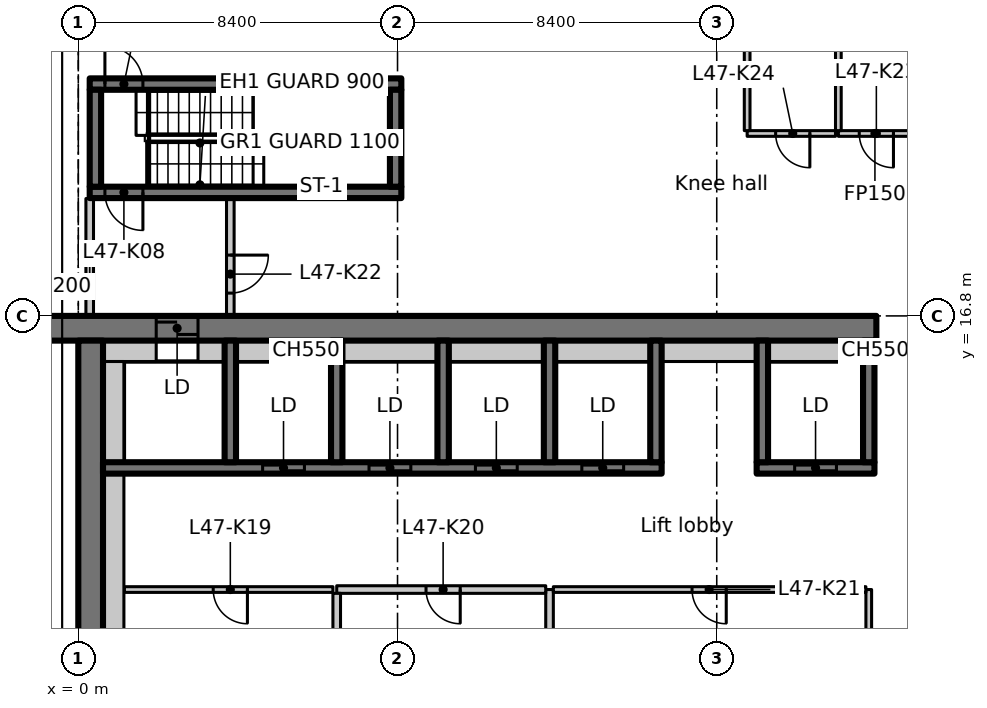
"""IFC4 building model, lengths in metres.
Left out: names, types, materials, properties, quantities, classifications, styles, units other than length and angle.
Written with IfcOpenShell. Run it as: python <this file> out.ifc"""

import sys

from ifc_helpers import new_model, si_unit, direction, frame, frame_2d, origin, place, context, subcontext, project, spatial, rectangle, extrude, element, fill, save


model = new_model("IFC4")
c1 = context("Model", 3, precision=1e-05, world=origin(), true_north=direction((0.0, 1.0)))
c2 = subcontext(c1, "Body", "Model", "MODEL_VIEW")
j1 = project(units=[si_unit("LENGTHUNIT", "METRE"), si_unit("PLANEANGLEUNIT", "RADIAN")], contexts=[c1])
p1 = place(None, origin())
s1 = spatial("IfcSite", under=j1, at=p1, CompositionType="ELEMENT")
p2 = place(p1, origin())
s2 = spatial("IfcBuilding", under=s1, at=p2, CompositionType="ELEMENT")
p3 = place(p2, frame((0.0, 0.0, 188.4)))
s3 = spatial("IfcBuildingStorey", under=s2, at=p3, CompositionType="ELEMENT", Elevation=188.4)
p4 = place(p3, frame((-1.1, 16.475, 0.0), z_axis=(0.0, 0.0, 1.0), x_axis=(1.0, 0.0, 0.0)))
e1 = element("IfcWall", 1, at=p4, inside=s3, PredefinedType="SHEAR", context=c2, shape_type="SweptSolid", body=[
    extrude(rectangle(XDim=22.1, YDim=0.65, at=frame_2d((11.05, 0.0))), origin(), (0.0, 0.0, 1.0), 3.35),
])
p5 = place(p4, frame((3.15, 0.0, 0.0)))
e2 = element("IfcOpeningElement", 2, at=p5, cuts=e1, PredefinedType="OPENING", context=c2, shape_type="SweptSolid", body=[
    extrude(rectangle(XDim=1.1, YDim=2.3, at=frame_2d((0.55, 1.15))), frame((0.0, 0.335, 0.0), z_axis=(0.0, -1.0, 0.0), x_axis=(1.0, 0.0, 0.0)), (0.0, 0.0, 1.0), 0.67),
])
p6 = place(p3, frame((0.325, 7.286, 0.0), z_axis=(0.0, 0.0, 1.0), x_axis=(0.0, 1.0, 0.0)))
e3 = element("IfcWall", 3, at=p6, inside=s3, PredefinedType="SHEAR", context=c2, shape_type="SweptSolid", body=[
    extrude(rectangle(XDim=8.864, YDim=0.65, at=frame_2d((4.432, 0.0))), origin(), (0.0, 0.0, 1.0), 3.35),
])
p7 = place(p3, frame((0.65, 15.875, 0.0), z_axis=(0.0, 0.0, 1.0), x_axis=(1.0, 0.0, 0.0)))
e4 = element("IfcWall", 4, at=p7, inside=s3, PredefinedType="PARTITIONING", context=c2, shape_type="SweptSolid", body=[
    extrude(rectangle(XDim=1.4, YDim=0.55, at=frame_2d((0.7, 0.0))), origin(), (0.0, 0.0, 1.0), 3.35),
])
p8 = place(p3, frame((0.65, 12.8, 0.0), z_axis=(0.0, 0.0, 1.0), x_axis=(1.0, 0.0, 0.0)))
e5 = element("IfcWall", 5, at=p8, inside=s3, PredefinedType="SHEAR", context=c2, shape_type="SweptSolid", body=[
    extrude(rectangle(XDim=14.7, YDim=0.3, at=frame_2d((7.35, 0.0))), origin(), (0.0, 0.0, 1.0), 3.35),
])
p9 = place(p8, frame((4.2, 0.0, 0.0)))
e6 = element("IfcOpeningElement", 6, at=p9, cuts=e5, PredefinedType="OPENING", context=c2, shape_type="SweptSolid", body=[
    extrude(rectangle(XDim=1.1, YDim=2.3, at=frame_2d((0.55, 1.15))), frame((0.0, 0.16, 0.0), z_axis=(0.0, -1.0, 0.0), x_axis=(1.0, 0.0, 0.0)), (0.0, 0.0, 1.0), 0.32),
])
p10 = place(p8, frame((7.0, 0.0, 0.0)))
e7 = element("IfcOpeningElement", 7, at=p10, cuts=e5, PredefinedType="OPENING", context=c2, shape_type="SweptSolid", body=[
    extrude(rectangle(XDim=1.1, YDim=2.3, at=frame_2d((0.55, 1.15))), frame((0.0, 0.16, 0.0), z_axis=(0.0, -1.0, 0.0), x_axis=(1.0, 0.0, 0.0)), (0.0, 0.0, 1.0), 0.32),
])
p11 = place(p8, frame((9.8, 0.0, 0.0)))
e8 = element("IfcOpeningElement", 8, at=p11, cuts=e5, PredefinedType="OPENING", context=c2, shape_type="SweptSolid", body=[
    extrude(rectangle(XDim=1.1, YDim=2.3, at=frame_2d((0.55, 1.15))), frame((0.0, 0.16, 0.0), z_axis=(0.0, -1.0, 0.0), x_axis=(1.0, 0.0, 0.0)), (0.0, 0.0, 1.0), 0.32),
])
p12 = place(p8, frame((12.6, 0.0, 0.0)))
e9 = element("IfcOpeningElement", 9, at=p12, cuts=e5, PredefinedType="OPENING", context=c2, shape_type="SweptSolid", body=[
    extrude(rectangle(XDim=1.1, YDim=2.3, at=frame_2d((0.55, 1.15))), frame((0.0, 0.16, 0.0), z_axis=(0.0, -1.0, 0.0), x_axis=(1.0, 0.0, 0.0)), (0.0, 0.0, 1.0), 0.32),
])
for number, where, z_axis, x_axis in (
    (10, (4.0, 12.95, 0.0), (0.0, 0.0, 1.0), (0.0, 1.0, 0.0)),
    (11, (6.8, 12.95, 0.0), (0.0, 0.0, 1.0), (0.0, 1.0, 0.0)),
    (12, (9.6, 12.95, 0.0), (0.0, 0.0, 1.0), (0.0, 1.0, 0.0)),
    (13, (12.4, 12.95, 0.0), (0.0, 0.0, 1.0), (0.0, 1.0, 0.0)),
    (14, (15.2, 12.95, 0.0), (0.0, 0.0, 1.0), (0.0, 1.0, 0.0)),
):
    element("IfcWall", number, at=place(p3, frame(where, z_axis=z_axis, x_axis=x_axis)), inside=s3, PredefinedType="SHEAR", context=c2, shape_type="SweptSolid", body=[
        extrude(rectangle(XDim=3.2, YDim=0.3, at=frame_2d((1.6, 0.0))), origin(), (0.0, 0.0, 1.0), 3.35),
    ])
p13 = place(p3, frame((17.85, 12.8, 0.0), z_axis=(0.0, 0.0, 1.0), x_axis=(1.0, 0.0, 0.0)))
e15 = element("IfcWall", 15, at=p13, inside=s3, PredefinedType="SHEAR", context=c2, shape_type="SweptSolid", body=[
    extrude(rectangle(XDim=3.1, YDim=0.3, at=frame_2d((1.55, 0.0))), origin(), (0.0, 0.0, 1.0), 3.35),
])
p14 = place(p13, frame((1.0, 0.0, 0.0)))
e16 = element("IfcOpeningElement", 16, at=p14, cuts=e15, PredefinedType="OPENING", context=c2, shape_type="SweptSolid", body=[
    extrude(rectangle(XDim=1.1, YDim=2.3, at=frame_2d((0.55, 1.15))), frame((0.0, 0.16, 0.0), z_axis=(0.0, -1.0, 0.0), x_axis=(1.0, 0.0, 0.0)), (0.0, 0.0, 1.0), 0.32),
])
for number, where, z_axis, x_axis in (
    (17, (18.0, 12.95, 0.0), (0.0, 0.0, 1.0), (0.0, 1.0, 0.0)),
    (18, (20.8, 12.95, 0.0), (0.0, 0.0, 1.0), (0.0, 1.0, 0.0)),
):
    element("IfcWall", number, at=place(p3, frame(where, z_axis=z_axis, x_axis=x_axis)), inside=s3, PredefinedType="SHEAR", context=c2, shape_type="SweptSolid", body=[
        extrude(rectangle(XDim=3.2, YDim=0.3, at=frame_2d((1.6, 0.0))), origin(), (0.0, 0.0, 1.0), 3.35),
    ])
p15 = place(p3, frame((8.5, 20.05, 0.0), z_axis=(0.0, 0.0, 1.0), x_axis=(-1.0, 0.0, 0.0)))
e19 = element("IfcWall", 19, at=p15, inside=s3, PredefinedType="SHEAR", context=c2, shape_type="SweptSolid", body=[
    extrude(rectangle(XDim=8.2, YDim=0.3, at=frame_2d((4.1, 0.0))), origin(), (0.0, 0.0, 1.0), 3.35),
])
p16 = place(p15, frame((6.8, 0.0, 0.0)))
e20 = element("IfcOpeningElement", 20, at=p16, cuts=e19, PredefinedType="OPENING", context=c2, shape_type="SweptSolid", body=[
    extrude(rectangle(XDim=1.0, YDim=2.1, at=frame_2d((0.5, 1.05))), frame((0.0, 0.16, 0.0), z_axis=(0.0, -1.0, 0.0), x_axis=(1.0, 0.0, 0.0)), (0.0, 0.0, 1.0), 0.32),
])
p17 = place(p3, frame((0.3, 22.9, 0.0), z_axis=(0.0, 0.0, 1.0), x_axis=(1.0, 0.0, 0.0)))
e21 = element("IfcWall", 21, at=p17, inside=s3, PredefinedType="SHEAR", context=c2, shape_type="SweptSolid", body=[
    extrude(rectangle(XDim=8.2, YDim=0.3, at=frame_2d((4.1, 0.0))), origin(), (0.0, 0.0, 1.0), 3.35),
])
p18 = place(p17, frame((0.4, 0.0, 0.0)))
e22 = element("IfcOpeningElement", 22, at=p18, cuts=e21, PredefinedType="OPENING", context=c2, shape_type="SweptSolid", body=[
    extrude(rectangle(XDim=1.0, YDim=2.1, at=frame_2d((0.5, 1.05))), frame((0.0, 0.16, 0.0), z_axis=(0.0, -1.0, 0.0), x_axis=(1.0, 0.0, 0.0)), (0.0, 0.0, 1.0), 0.32),
])
for number, where, z_axis, x_axis in (
    (23, (0.45, 20.2, 0.0), (0.0, 0.0, 1.0), (0.0, 1.0, 0.0)),
    (24, (8.35, 20.2, 0.0), (0.0, 0.0, 1.0), (0.0, 1.0, 0.0)),
):
    element("IfcWall", number, at=place(p3, frame(where, z_axis=z_axis, x_axis=x_axis)), inside=s3, PredefinedType="SHEAR", context=c2, shape_type="SweptSolid", body=[
        extrude(rectangle(XDim=2.55, YDim=0.3, at=frame_2d((1.275, 0.0))), origin(), (0.0, 0.0, 1.0), 3.35),
    ])
p19 = place(p3, frame((0.3, 16.812, 0.0), z_axis=(0.0, 0.0, 1.0), x_axis=(0.0, 1.0, 0.0)))
e25 = element("IfcWall", 25, at=p19, inside=s3, PredefinedType="PARTITIONING", context=c2, shape_type="SweptSolid", body=[
    extrude(rectangle(XDim=3.076, YDim=0.2, at=frame_2d((1.538, 0.0))), origin(), (0.0, 0.0, 1.0), 2.98),
])
p20 = place(p3, frame((4.0, 19.888, 0.0), z_axis=(0.0, 0.0, 1.0), x_axis=(0.0, -1.0, 0.0)))
e26 = element("IfcWall", 26, at=p20, inside=s3, PredefinedType="PARTITIONING", context=c2, shape_type="SweptSolid", body=[
    extrude(rectangle(XDim=3.076, YDim=0.2, at=frame_2d((1.538, 0.0))), origin(), (0.0, 0.0, 1.0), 3.35),
])
p21 = place(p20, frame((1.488, 0.0, 0.0)))
e27 = element("IfcOpeningElement", 27, at=p21, cuts=e26, PredefinedType="OPENING", context=c2, shape_type="SweptSolid", body=[
    extrude(rectangle(XDim=1.0, YDim=2.1, at=frame_2d((0.5, 1.05))), frame((0.0, 0.11, 0.0), z_axis=(0.0, -1.0, 0.0), x_axis=(1.0, 0.0, 0.0)), (0.0, 0.0, 1.0), 0.22),
])
p22 = place(p3, frame((12.4, 7.1, 0.0), z_axis=(0.0, 0.0, 1.0), x_axis=(0.0, 1.0, 0.0)))
e28 = element("IfcWall", 28, at=p22, inside=s3, PredefinedType="PARTITIONING", context=c2, shape_type="SweptSolid", body=[
    extrude(rectangle(XDim=2.5, YDim=0.2, at=frame_2d((1.25, 0.0))), origin(), (0.0, 0.0, 1.0), 3.35),
])
p23 = place(p3, frame((12.3, 9.6, 0.0), z_axis=(0.0, 0.0, 1.0), x_axis=(-1.0, 0.0, 0.0)))
e29 = element("IfcWall", 29, at=p23, inside=s3, PredefinedType="PARTITIONING", context=c2, shape_type="SweptSolid", body=[
    extrude(rectangle(XDim=5.5, YDim=0.2, at=frame_2d((2.75, 0.0))), origin(), (0.0, 0.0, 1.0), 3.35),
])
p24 = place(p23, frame((2.25, 0.0, 0.0)))
e30 = element("IfcOpeningElement", 30, at=p24, cuts=e29, PredefinedType="OPENING", context=c2, shape_type="SweptSolid", body=[
    extrude(rectangle(XDim=0.9, YDim=2.1, at=frame_2d((0.45, 1.05))), frame((0.0, 0.11, 0.0), z_axis=(0.0, -1.0, 0.0), x_axis=(1.0, 0.0, 0.0)), (0.0, 0.0, 1.0), 0.22),
])
p25 = place(p3, frame((6.8, 9.5, 0.0), z_axis=(0.0, 0.0, 1.0), x_axis=(0.0, -1.0, 0.0)))
e31 = element("IfcWall", 31, at=p25, inside=s3, PredefinedType="PARTITIONING", context=c2, shape_type="SweptSolid", body=[
    extrude(rectangle(XDim=2.4, YDim=0.2, at=frame_2d((1.2, 0.0))), origin(), (0.0, 0.0, 1.0), 3.35),
])
p26 = place(p3, frame((6.7, 9.6, 0.0), z_axis=(0.0, 0.0, 1.0), x_axis=(-1.0, 0.0, 0.0)))
e32 = element("IfcWall", 32, at=p26, inside=s3, PredefinedType="PARTITIONING", context=c2, shape_type="SweptSolid", body=[
    extrude(rectangle(XDim=5.488, YDim=0.15, at=frame_2d((2.744, 0.0))), origin(), (0.0, 0.0, 1.0), 3.35),
])
p27 = place(p26, frame((2.25, 0.0, 0.0)))
e33 = element("IfcOpeningElement", 33, at=p27, cuts=e32, PredefinedType="OPENING", context=c2, shape_type="SweptSolid", body=[
    extrude(rectangle(XDim=0.9, YDim=2.1, at=frame_2d((0.45, 1.05))), frame((0.0, 0.085, 0.0), z_axis=(0.0, -1.0, 0.0), x_axis=(1.0, 0.0, 0.0)), (0.0, 0.0, 1.0), 0.17),
])
p28 = place(p3, frame((20.8, 7.075, 0.0), z_axis=(0.0, 0.0, 1.0), x_axis=(0.0, 1.0, 0.0)))
e34 = element("IfcWall", 34, at=p28, inside=s3, PredefinedType="PARTITIONING", context=c2, shape_type="SweptSolid", body=[
    extrude(rectangle(XDim=2.525, YDim=0.15, at=frame_2d((1.263, 0.0))), origin(), (0.0, 0.0, 1.0), 3.35),
])
p29 = place(p3, frame((20.725, 9.6, 0.0), z_axis=(0.0, 0.0, 1.0), x_axis=(-1.0, 0.0, 0.0)))
e35 = element("IfcWall", 35, at=p29, inside=s3, PredefinedType="PARTITIONING", context=c2, shape_type="SweptSolid", body=[
    extrude(rectangle(XDim=8.225, YDim=0.15, at=frame_2d((4.113, 0.0))), origin(), (0.0, 0.0, 1.0), 3.35),
])
p30 = place(p29, frame((3.675, 0.0, 0.0)))
e36 = element("IfcOpeningElement", 36, at=p30, cuts=e35, PredefinedType="OPENING", context=c2, shape_type="SweptSolid", body=[
    extrude(rectangle(XDim=0.9, YDim=2.1, at=frame_2d((0.45, 1.05))), frame((0.0, 0.085, 0.0), z_axis=(0.0, -1.0, 0.0), x_axis=(1.0, 0.0, 0.0)), (0.0, 0.0, 1.0), 0.17),
])
p31 = place(p3, frame((21.925, 21.6, 0.0), z_axis=(0.0, 0.0, 1.0), x_axis=(-1.0, 0.0, 0.0)))
e37 = element("IfcWall", 37, at=p31, inside=s3, PredefinedType="PARTITIONING", context=c2, shape_type="SweptSolid", body=[
    extrude(rectangle(XDim=1.925, YDim=0.15, at=frame_2d((0.962, 0.0))), origin(), (0.0, 0.0, 1.0), 3.35),
])
p32 = place(p31, frame((0.475, 0.0, 0.0)))
e38 = element("IfcOpeningElement", 38, at=p32, cuts=e37, PredefinedType="OPENING", context=c2, shape_type="SweptSolid", body=[
    extrude(rectangle(XDim=0.9, YDim=2.1, at=frame_2d((0.45, 1.05))), frame((0.0, 0.085, 0.0), z_axis=(0.0, -1.0, 0.0), x_axis=(1.0, 0.0, 0.0)), (0.0, 0.0, 1.0), 0.17),
])
p33 = place(p3, frame((20.0, 21.675, 0.0), z_axis=(0.0, 0.0, 1.0), x_axis=(0.0, 1.0, 0.0)))
e39 = element("IfcWall", 39, at=p33, inside=s3, PredefinedType="PARTITIONING", context=c2, shape_type="SweptSolid", body=[
    extrude(rectangle(XDim=2.25, YDim=0.15, at=frame_2d((1.125, 0.0))), origin(), (0.0, 0.0, 1.0), 3.35),
])
p34 = place(p3, frame((19.925, 21.6, 0.0), z_axis=(0.0, 0.0, 1.0), x_axis=(-1.0, 0.0, 0.0)))
e40 = element("IfcWall", 40, at=p34, inside=s3, PredefinedType="PARTITIONING", context=c2, shape_type="SweptSolid", body=[
    extrude(rectangle(XDim=2.325, YDim=0.15, at=frame_2d((1.163, 0.0))), origin(), (0.0, 0.0, 1.0), 3.35),
])
p35 = place(p34, frame((0.675, 0.0, 0.0)))
e41 = element("IfcOpeningElement", 41, at=p35, cuts=e40, PredefinedType="OPENING", context=c2, shape_type="SweptSolid", body=[
    extrude(rectangle(XDim=0.9, YDim=2.1, at=frame_2d((0.45, 1.05))), frame((0.0, 0.085, 0.0), z_axis=(0.0, -1.0, 0.0), x_axis=(1.0, 0.0, 0.0)), (0.0, 0.0, 1.0), 0.17),
])
p36 = place(p3, frame((17.6, 21.675, 0.0), z_axis=(0.0, 0.0, 1.0), x_axis=(0.0, 1.0, 0.0)))
e42 = element("IfcWall", 42, at=p36, inside=s3, PredefinedType="PARTITIONING", context=c2, shape_type="SweptSolid", body=[
    extrude(rectangle(XDim=2.325, YDim=0.15, at=frame_2d((1.163, 0.0))), origin(), (0.0, 0.0, 1.0), 3.35),
])
p37 = place(p3, frame((0.925, 7.286, 0.0), z_axis=(0.0, 0.0, 1.0), x_axis=(0.0, 1.0, 0.0)))
e43 = element("IfcWall", 43, at=p37, inside=s3, PredefinedType="PARTITIONING", context=c2, shape_type="SweptSolid", body=[
    extrude(rectangle(XDim=5.364, YDim=0.55, at=frame_2d((2.682, 0.0))), origin(), (0.0, 0.0, 1.0), 3.35),
])
p38 = place(p3, frame((0.925, 12.95, 0.0), z_axis=(0.0, 0.0, 1.0), x_axis=(0.0, 1.0, 0.0)))
e44 = element("IfcWall", 44, at=p38, inside=s3, PredefinedType="PARTITIONING", context=c2, shape_type="SweptSolid", body=[
    extrude(rectangle(XDim=2.65, YDim=0.55, at=frame_2d((1.325, 0.0))), origin(), (0.0, 0.0, 1.0), 3.35),
])
p39 = place(p3, frame((3.15, 15.875, 0.0), z_axis=(0.0, 0.0, 1.0), x_axis=(1.0, 0.0, 0.0)))
e45 = element("IfcWall", 45, at=p39, inside=s3, PredefinedType="PARTITIONING", context=c2, shape_type="SweptSolid", body=[
    extrude(rectangle(XDim=0.7, YDim=0.55, at=frame_2d((0.35, 0.0))), origin(), (0.0, 0.0, 1.0), 3.35),
])
for number, where, z_axis, x_axis in (
    (46, (4.15, 15.875, 0.0), (0.0, 0.0, 1.0), (1.0, 0.0, 0.0)),
    (47, (6.95, 15.875, 0.0), (0.0, 0.0, 1.0), (1.0, 0.0, 0.0)),
    (48, (9.75, 15.875, 0.0), (0.0, 0.0, 1.0), (1.0, 0.0, 0.0)),
    (49, (12.55, 15.875, 0.0), (0.0, 0.0, 1.0), (1.0, 0.0, 0.0)),
    (50, (15.35, 15.875, 0.0), (0.0, 0.0, 1.0), (1.0, 0.0, 0.0)),
    (51, (18.15, 15.875, 0.0), (0.0, 0.0, 1.0), (1.0, 0.0, 0.0)),
):
    element("IfcWall", number, at=place(p3, frame(where, z_axis=z_axis, x_axis=x_axis)), inside=s3, PredefinedType="PARTITIONING", context=c2, shape_type="SweptSolid", body=[
        extrude(rectangle(XDim=2.5, YDim=0.55, at=frame_2d((1.25, 0.0))), origin(), (0.0, 0.0, 1.0), 3.35),
    ])
p40 = place(p3, frame((20.95, 15.875, 0.0), z_axis=(0.0, 0.0, 1.0), x_axis=(1.0, 0.0, 0.0)))
e52 = element("IfcWall", 52, at=p40, inside=s3, PredefinedType="PARTITIONING", context=c2, shape_type="SweptSolid", body=[
    extrude(rectangle(XDim=0.05, YDim=0.55, at=frame_2d((0.025, 0.0))), origin(), (0.0, 0.0, 1.0), 3.35),
])
p41 = place(p5, origin())
e53 = element("IfcDoor", 53, at=p41, inside=s3, OperationType="SLIDING_TO_LEFT", PredefinedType="DOOR", context=c2, shape_type="SweptSolid", body=[
    extrude(rectangle(XDim=1.1, YDim=2.3, at=frame_2d((0.55, 1.15))), frame((0.0, 0.025, 0.0), z_axis=(0.0, -1.0, 0.0), x_axis=(1.0, 0.0, 0.0)), (0.0, 0.0, 1.0), 0.05),
])
fill(e2, e53)
p42 = place(p9, origin())
e54 = element("IfcDoor", 54, at=p42, inside=s3, OperationType="SLIDING_TO_LEFT", PredefinedType="DOOR", context=c2, shape_type="SweptSolid", body=[
    extrude(rectangle(XDim=1.1, YDim=2.3, at=frame_2d((0.55, 1.15))), frame((0.0, 0.025, 0.0), z_axis=(0.0, -1.0, 0.0), x_axis=(1.0, 0.0, 0.0)), (0.0, 0.0, 1.0), 0.05),
])
fill(e6, e54)
p43 = place(p10, origin())
e55 = element("IfcDoor", 55, at=p43, inside=s3, OperationType="SLIDING_TO_LEFT", PredefinedType="DOOR", context=c2, shape_type="SweptSolid", body=[
    extrude(rectangle(XDim=1.1, YDim=2.3, at=frame_2d((0.55, 1.15))), frame((0.0, 0.025, 0.0), z_axis=(0.0, -1.0, 0.0), x_axis=(1.0, 0.0, 0.0)), (0.0, 0.0, 1.0), 0.05),
])
fill(e7, e55)
p44 = place(p11, origin())
e56 = element("IfcDoor", 56, at=p44, inside=s3, OperationType="SLIDING_TO_LEFT", PredefinedType="DOOR", context=c2, shape_type="SweptSolid", body=[
    extrude(rectangle(XDim=1.1, YDim=2.3, at=frame_2d((0.55, 1.15))), frame((0.0, 0.025, 0.0), z_axis=(0.0, -1.0, 0.0), x_axis=(1.0, 0.0, 0.0)), (0.0, 0.0, 1.0), 0.05),
])
fill(e8, e56)
p45 = place(p12, origin())
e57 = element("IfcDoor", 57, at=p45, inside=s3, OperationType="SLIDING_TO_LEFT", PredefinedType="DOOR", context=c2, shape_type="SweptSolid", body=[
    extrude(rectangle(XDim=1.1, YDim=2.3, at=frame_2d((0.55, 1.15))), frame((0.0, 0.025, 0.0), z_axis=(0.0, -1.0, 0.0), x_axis=(1.0, 0.0, 0.0)), (0.0, 0.0, 1.0), 0.05),
])
fill(e9, e57)
p46 = place(p14, origin())
e58 = element("IfcDoor", 58, at=p46, inside=s3, OperationType="SLIDING_TO_LEFT", PredefinedType="DOOR", context=c2, shape_type="SweptSolid", body=[
    extrude(rectangle(XDim=1.1, YDim=2.3, at=frame_2d((0.55, 1.15))), frame((0.0, 0.025, 0.0), z_axis=(0.0, -1.0, 0.0), x_axis=(1.0, 0.0, 0.0)), (0.0, 0.0, 1.0), 0.05),
])
fill(e16, e58)
p47 = place(p16, origin())
e59 = element("IfcDoor", 59, at=p47, inside=s3, OperationType="SINGLE_SWING_RIGHT", PredefinedType="DOOR", context=c2, shape_type="SweptSolid", body=[
    extrude(rectangle(XDim=1.0, YDim=2.1, at=frame_2d((0.5, 1.05))), frame((0.0, 0.025, 0.0), z_axis=(0.0, -1.0, 0.0), x_axis=(1.0, 0.0, 0.0)), (0.0, 0.0, 1.0), 0.05),
])
fill(e20, e59)
p48 = place(p18, origin())
e60 = element("IfcDoor", 60, at=p48, inside=s3, OperationType="SINGLE_SWING_LEFT", PredefinedType="DOOR", context=c2, shape_type="SweptSolid", body=[
    extrude(rectangle(XDim=1.0, YDim=2.1, at=frame_2d((0.5, 1.05))), frame((0.0, 0.025, 0.0), z_axis=(0.0, -1.0, 0.0), x_axis=(1.0, 0.0, 0.0)), (0.0, 0.0, 1.0), 0.05),
])
fill(e22, e60)
p49 = place(p27, origin())
e61 = element("IfcDoor", 61, at=p49, inside=s3, OperationType="SINGLE_SWING_LEFT", PredefinedType="DOOR", context=c2, shape_type="SweptSolid", body=[
    extrude(rectangle(XDim=0.9, YDim=2.1, at=frame_2d((0.45, 1.05))), frame((0.0, 0.025, 0.0), z_axis=(0.0, -1.0, 0.0), x_axis=(1.0, 0.0, 0.0)), (0.0, 0.0, 1.0), 0.05),
])
fill(e33, e61)
p50 = place(p24, origin())
e62 = element("IfcDoor", 62, at=p50, inside=s3, OperationType="SINGLE_SWING_RIGHT", PredefinedType="DOOR", context=c2, shape_type="SweptSolid", body=[
    extrude(rectangle(XDim=0.9, YDim=2.1, at=frame_2d((0.45, 1.05))), frame((0.0, 0.025, 0.0), z_axis=(0.0, -1.0, 0.0), x_axis=(1.0, 0.0, 0.0)), (0.0, 0.0, 1.0), 0.05),
])
fill(e30, e62)
p51 = place(p30, origin())
e63 = element("IfcDoor", 63, at=p51, inside=s3, OperationType="SINGLE_SWING_LEFT", PredefinedType="DOOR", context=c2, shape_type="SweptSolid", body=[
    extrude(rectangle(XDim=0.9, YDim=2.1, at=frame_2d((0.45, 1.05))), frame((0.0, 0.025, 0.0), z_axis=(0.0, -1.0, 0.0), x_axis=(1.0, 0.0, 0.0)), (0.0, 0.0, 1.0), 0.05),
])
fill(e36, e63)
p52 = place(p21, origin())
e64 = element("IfcDoor", 64, at=p52, inside=s3, OperationType="SINGLE_SWING_RIGHT", PredefinedType="DOOR", context=c2, shape_type="SweptSolid", body=[
    extrude(rectangle(XDim=1.0, YDim=2.1, at=frame_2d((0.5, 1.05))), frame((0.0, 0.025, 0.0), z_axis=(0.0, -1.0, 0.0), x_axis=(1.0, 0.0, 0.0)), (0.0, 0.0, 1.0), 0.05),
])
fill(e27, e64)
p53 = place(p32, origin())
e65 = element("IfcDoor", 65, at=p53, inside=s3, OperationType="SINGLE_SWING_LEFT", PredefinedType="DOOR", context=c2, shape_type="SweptSolid", body=[
    extrude(rectangle(XDim=0.9, YDim=2.1, at=frame_2d((0.45, 1.05))), frame((0.0, 0.025, 0.0), z_axis=(0.0, -1.0, 0.0), x_axis=(1.0, 0.0, 0.0)), (0.0, 0.0, 1.0), 0.05),
])
fill(e38, e65)
p54 = place(p35, origin())
e66 = element("IfcDoor", 66, at=p54, inside=s3, OperationType="SINGLE_SWING_RIGHT", PredefinedType="DOOR", context=c2, shape_type="SweptSolid", body=[
    extrude(rectangle(XDim=0.9, YDim=2.1, at=frame_2d((0.45, 1.05))), frame((0.0, 0.025, 0.0), z_axis=(0.0, -1.0, 0.0), x_axis=(1.0, 0.0, 0.0)), (0.0, 0.0, 1.0), 0.05),
])
fill(e41, e66)
save(model, sys.argv[1])
